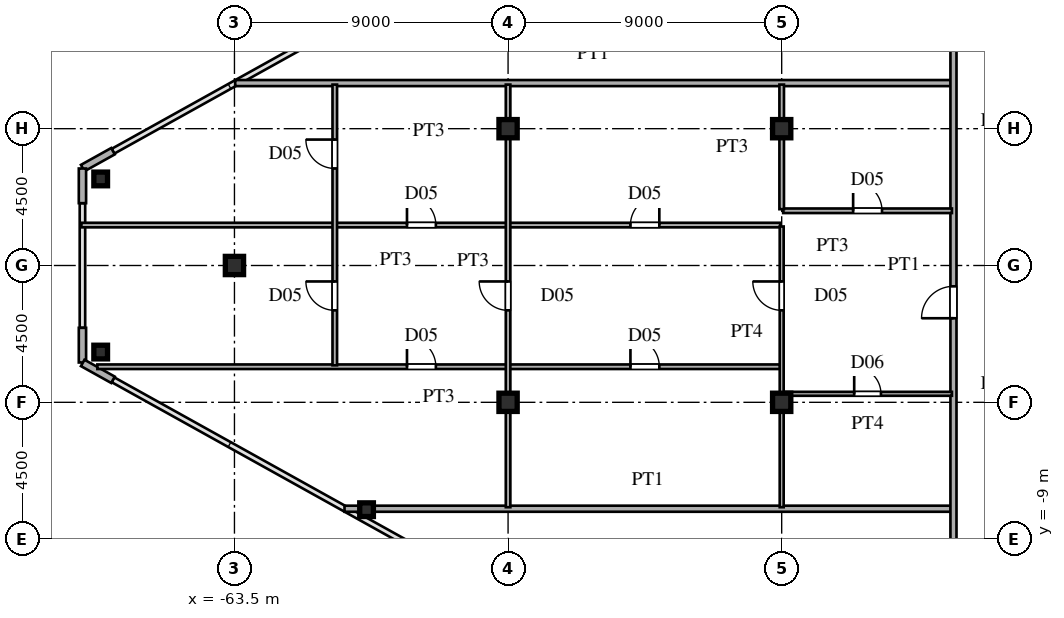
"""IFC4 building model, lengths in metres.
Left out: names, types, materials, properties, quantities, classifications, styles, units other than length and angle.
Written with IfcOpenShell. Run it as: python <this file> out.ifc"""

import sys

from ifc_helpers import new_model, si_unit, direction, frame, frame_2d, origin, origin_2d, place, context, subcontext, project, spatial, rectangle, hollow_rectangle, i_section, extrude, source, transform, mapped, element, fill, save


model = new_model("IFC4")
c1 = context("Model", 3, precision=1e-05, world=origin(), true_north=direction((0.0, 1.0)))
c2 = subcontext(c1, "Body", "Model", "MODEL_VIEW")
j1 = project(units=[si_unit("LENGTHUNIT", "METRE"), si_unit("PLANEANGLEUNIT", "RADIAN")], contexts=[c1])
p1 = place(None, origin())
s1 = spatial("IfcSite", under=j1, at=p1, CompositionType="ELEMENT")
p2 = place(p1, origin())
s2 = spatial("IfcBuilding", under=s1, at=p2, CompositionType="ELEMENT")
p3 = place(p2, frame((0.0, 0.0, 170.7)))
s3 = spatial("IfcBuildingStorey", under=s2, at=p3, CompositionType="ELEMENT", Elevation=170.7)
m1 = source(origin(), c2, "Body", "SweptSolid", [
    extrude(i_section(OverallWidth=0.6, OverallDepth=0.6, WebThickness=0.025, FlangeThickness=0.04, at=origin_2d()), origin(), (0.0, 0.0, 1.0), 3.6),
])
for number, where, z_axis, x_axis in (
    (1, (-45.5, -4.5, 0.0), (0.0, 0.0, 1.0), (1.0, 0.0, 0.0)),
    (2, (-45.5, 4.5, 0.0), (0.0, 0.0, 1.0), (1.0, 0.0, 0.0)),
    (3, (-54.5, -4.5, 0.0), (0.0, 0.0, 1.0), (1.0, 0.0, 0.0)),
    (4, (-54.5, 4.5, 0.0), (0.0, 0.0, 1.0), (1.0, 0.0, 0.0)),
    (5, (-63.5, 0.0, 0.0), (0.0, 0.0, 1.0), (1.0, 0.0, 0.0)),
):
    element("IfcColumn", number, at=place(p3, frame(where, z_axis=z_axis, x_axis=x_axis)), inside=s3, PredefinedType="COLUMN", context=c2, shape_type="MappedRepresentation", body=[
        mapped(m1, transform((0.0, 0.0, 0.0), scale=1.0)),
    ])
m2 = source(origin(), c2, "Body", "SweptSolid", [
    extrude(hollow_rectangle(XDim=0.45, YDim=0.45, WallThickness=0.018, at=origin_2d()), origin(), (0.0, 0.0, 1.0), 3.6),
])
for number, where, z_axis, x_axis in (
    (6, (-67.9, 2.847, 0.0), (0.0, 0.0, 1.0), (1.0, 0.0, 0.0)),
    (7, (-67.9, -2.847, 0.0), (0.0, 0.0, 1.0), (1.0, 0.0, 0.0)),
    (8, (-59.155, -8.031, 0.0), (0.0, 0.0, 1.0), (1.0, 0.0, 0.0)),
):
    element("IfcColumn", number, at=place(p3, frame(where, z_axis=z_axis, x_axis=x_axis)), inside=s3, PredefinedType="COLUMN", context=c2, shape_type="MappedRepresentation", body=[
        mapped(m2, transform((0.0, 0.0, 0.0), scale=1.0)),
    ])
for number, where, z_axis, x_axis in (
    (9, (-67.495, 3.759, 0.0), (0.0, 0.0, 1.0), (-0.874, -0.486, 0.0)),
    (10, (-68.5, 3.19, 0.0), (0.0, 0.0, 1.0), (0.0, -1.0, 0.0)),
    (11, (-68.5, -2.05, 0.0), (0.0, 0.0, 1.0), (0.0, -1.0, 0.0)),
    (12, (-68.491, -3.205, 0.0), (0.0, 0.0, 1.0), (0.874, -0.486, 0.0)),
):
    element("IfcWall", number, at=place(p3, frame(where, z_axis=z_axis, x_axis=x_axis)), inside=s3, PredefinedType="SOLIDWALL", context=c2, shape_type="SweptSolid", body=[
        extrude(rectangle(XDim=1.14, YDim=0.24, at=frame_2d((0.57, 0.0))), origin(), (0.0, 0.0, 1.0), 3.38),
    ])
p4 = place(p3, frame((-59.88, -8.0, 0.0), z_axis=(0.0, 0.0, 1.0), x_axis=(1.0, 0.0, 0.0)))
e13 = element("IfcWall", 13, at=p4, inside=s3, PredefinedType="PARTITIONING", context=c2, shape_type="SweptSolid", body=[
    extrude(rectangle(XDim=19.95, YDim=0.2, at=frame_2d((9.975, 0.0))), origin(), (0.0, 0.0, 1.0), 3.38),
])
p5 = place(p3, frame((-45.45, -4.22, 0.0), z_axis=(0.0, 0.0, 1.0), x_axis=(1.0, 0.0, 0.0)))
e14 = element("IfcWall", 14, at=p5, inside=s3, PredefinedType="PARTITIONING", context=c2, shape_type="SweptSolid", body=[
    extrude(rectangle(XDim=5.55, YDim=0.13, at=frame_2d((2.775, 0.0))), origin(), (0.0, 0.0, 1.0), 3.38),
])
p6 = place(p5, frame((2.335, 0.0, 0.0)))
e15 = element("IfcOpeningElement", 15, at=p6, cuts=e14, PredefinedType="OPENING", context=c2, shape_type="SweptSolid", body=[
    extrude(rectangle(XDim=0.88, YDim=2.1, at=frame_2d((0.44, 1.05))), frame((0.0, 0.075, 0.0), z_axis=(0.0, -1.0, 0.0), x_axis=(1.0, 0.0, 0.0)), (0.0, 0.0, 1.0), 0.15),
])
p7 = place(p3, frame((-68.009, -3.33, 0.0), z_axis=(0.0, 0.0, 1.0), x_axis=(1.0, 0.0, 0.0)))
e16 = element("IfcWall", 16, at=p7, inside=s3, PredefinedType="PARTITIONING", context=c2, shape_type="SweptSolid", body=[
    extrude(rectangle(XDim=22.459, YDim=0.15, at=frame_2d((11.229, 0.0))), origin(), (0.0, 0.0, 1.0), 3.38),
])
p8 = place(p7, frame((17.534, 0.0, 0.0)))
e17 = element("IfcOpeningElement", 17, at=p8, cuts=e16, PredefinedType="OPENING", context=c2, shape_type="SweptSolid", body=[
    extrude(rectangle(XDim=0.95, YDim=2.15, at=frame_2d((0.475, 1.075))), frame((0.0, 0.085, 0.0), z_axis=(0.0, -1.0, 0.0), x_axis=(1.0, 0.0, 0.0)), (0.0, 0.0, 1.0), 0.17),
])
p9 = place(p7, frame((10.184, 0.0, 0.0)))
e18 = element("IfcOpeningElement", 18, at=p9, cuts=e16, PredefinedType="OPENING", context=c2, shape_type="SweptSolid", body=[
    extrude(rectangle(XDim=0.95, YDim=2.15, at=frame_2d((0.475, 1.075))), frame((0.0, 0.085, 0.0), z_axis=(0.0, -1.0, 0.0), x_axis=(1.0, 0.0, 0.0)), (0.0, 0.0, 1.0), 0.17),
])
p10 = place(p3, frame((-68.535, 1.33, 0.0), z_axis=(0.0, 0.0, 1.0), x_axis=(1.0, 0.0, 0.0)))
e19 = element("IfcWall", 19, at=p10, inside=s3, PredefinedType="PARTITIONING", context=c2, shape_type="SweptSolid", body=[
    extrude(rectangle(XDim=22.985, YDim=0.15, at=frame_2d((11.492, 0.0))), origin(), (0.0, 0.0, 1.0), 3.38),
])
p11 = place(p10, frame((18.06, 0.0, 0.0)))
e20 = element("IfcOpeningElement", 20, at=p11, cuts=e19, PredefinedType="OPENING", context=c2, shape_type="SweptSolid", body=[
    extrude(rectangle(XDim=0.95, YDim=2.15, at=frame_2d((0.475, 1.075))), frame((0.0, 0.085, 0.0), z_axis=(0.0, -1.0, 0.0), x_axis=(1.0, 0.0, 0.0)), (0.0, 0.0, 1.0), 0.17),
])
p12 = place(p10, frame((10.71, 0.0, 0.0)))
e21 = element("IfcOpeningElement", 21, at=p12, cuts=e19, PredefinedType="OPENING", context=c2, shape_type="SweptSolid", body=[
    extrude(rectangle(XDim=0.95, YDim=2.15, at=frame_2d((0.475, 1.075))), frame((0.0, 0.085, 0.0), z_axis=(0.0, -1.0, 0.0), x_axis=(1.0, 0.0, 0.0)), (0.0, 0.0, 1.0), 0.17),
])
p13 = place(p3, frame((-45.45, 1.8, 0.0), z_axis=(0.0, 0.0, 1.0), x_axis=(1.0, 0.0, 0.0)))
e22 = element("IfcWall", 22, at=p13, inside=s3, PredefinedType="PARTITIONING", context=c2, shape_type="SweptSolid", body=[
    extrude(rectangle(XDim=5.55, YDim=0.15, at=frame_2d((2.775, 0.0))), origin(), (0.0, 0.0, 1.0), 3.38),
])
p14 = place(p13, frame((2.3, 0.0, 0.0)))
e23 = element("IfcOpeningElement", 23, at=p14, cuts=e22, PredefinedType="OPENING", context=c2, shape_type="SweptSolid", body=[
    extrude(rectangle(XDim=0.95, YDim=2.15, at=frame_2d((0.475, 1.075))), frame((0.0, 0.085, 0.0), z_axis=(0.0, -1.0, 0.0), x_axis=(1.0, 0.0, 0.0)), (0.0, 0.0, 1.0), 0.17),
])
p15 = place(p3, frame((-63.476, 6.0, 0.0), z_axis=(0.0, 0.0, 1.0), x_axis=(1.0, 0.0, 0.0)))
e24 = element("IfcWall", 24, at=p15, inside=s3, PredefinedType="PARTITIONING", context=c2, shape_type="SweptSolid", body=[
    extrude(rectangle(XDim=23.546, YDim=0.2, at=frame_2d((11.773, 0.0))), origin(), (0.0, 0.0, 1.0), 3.38),
])
p16 = place(p3, frame((-60.2, -3.283, 0.0), z_axis=(0.0, 0.0, 1.0), x_axis=(0.0, 1.0, 0.0)))
e25 = element("IfcWall", 25, at=p16, inside=s3, PredefinedType="PARTITIONING", context=c2, shape_type="SweptSolid", body=[
    extrude(rectangle(XDim=9.233, YDim=0.15, at=frame_2d((4.616, 0.0))), origin(), (0.0, 0.0, 1.0), 3.38),
])
p17 = place(p16, frame((1.808, 0.0, 0.0)))
e26 = element("IfcOpeningElement", 26, at=p17, cuts=e25, PredefinedType="OPENING", context=c2, shape_type="SweptSolid", body=[
    extrude(rectangle(XDim=0.95, YDim=2.15, at=frame_2d((0.475, 1.075))), frame((0.0, 0.085, 0.0), z_axis=(0.0, -1.0, 0.0), x_axis=(1.0, 0.0, 0.0)), (0.0, 0.0, 1.0), 0.17),
])
p18 = place(p16, frame((6.475, 0.0, 0.0)))
e27 = element("IfcOpeningElement", 27, at=p18, cuts=e25, PredefinedType="OPENING", context=c2, shape_type="SweptSolid", body=[
    extrude(rectangle(XDim=0.95, YDim=2.15, at=frame_2d((0.475, 1.075))), frame((0.0, 0.085, 0.0), z_axis=(0.0, -1.0, 0.0), x_axis=(1.0, 0.0, 0.0)), (0.0, 0.0, 1.0), 0.17),
])
p19 = place(p3, frame((-54.5, -7.95, 0.0), z_axis=(0.0, 0.0, 1.0), x_axis=(0.0, 1.0, 0.0)))
e28 = element("IfcWall", 28, at=p19, inside=s3, PredefinedType="PARTITIONING", context=c2, shape_type="SweptSolid", body=[
    extrude(rectangle(XDim=13.9, YDim=0.15, at=frame_2d((6.95, 0.0))), origin(), (0.0, 0.0, 1.0), 2.78),
])
p20 = place(p19, frame((6.475, 0.0, 0.0)))
e29 = element("IfcOpeningElement", 29, at=p20, cuts=e28, PredefinedType="OPENING", context=c2, shape_type="SweptSolid", body=[
    extrude(rectangle(XDim=0.95, YDim=2.15, at=frame_2d((0.475, 1.075))), frame((0.0, 0.085, 0.0), z_axis=(0.0, -1.0, 0.0), x_axis=(1.0, 0.0, 0.0)), (0.0, 0.0, 1.0), 0.17),
])
p21 = place(p3, frame((-45.5, -7.95, 0.0), z_axis=(0.0, 0.0, 1.0), x_axis=(0.0, 1.0, 0.0)))
e30 = element("IfcWall", 30, at=p21, inside=s3, PredefinedType="PARTITIONING", context=c2, shape_type="SweptSolid", body=[
    extrude(rectangle(XDim=9.233, YDim=0.13, at=frame_2d((4.616, 0.0))), origin(), (0.0, 0.0, 1.0), 2.78),
])
p22 = place(p21, frame((6.475, 0.0, 0.0)))
e31 = element("IfcOpeningElement", 31, at=p22, cuts=e30, PredefinedType="OPENING", context=c2, shape_type="SweptSolid", body=[
    extrude(rectangle(XDim=0.95, YDim=2.15, at=frame_2d((0.475, 1.075))), frame((0.0, 0.075, 0.0), z_axis=(0.0, -1.0, 0.0), x_axis=(1.0, 0.0, 0.0)), (0.0, 0.0, 1.0), 0.15),
])
p23 = place(p3, frame((-45.5, 1.852, 0.0), z_axis=(0.0, 0.0, 1.0), x_axis=(0.0, 1.0, 0.0)))
e32 = element("IfcWall", 32, at=p23, inside=s3, PredefinedType="PARTITIONING", context=c2, shape_type="SweptSolid", body=[
    extrude(rectangle(XDim=4.098, YDim=0.15, at=frame_2d((2.049, 0.0))), origin(), (0.0, 0.0, 1.0), 2.78),
])
p24 = place(p3, frame((-39.85, -15.715, 0.0), z_axis=(0.0, 0.0, 1.0), x_axis=(0.0, 1.0, 0.0)))
e33 = element("IfcWall", 33, at=p24, inside=s3, PredefinedType="PARTITIONING", context=c2, shape_type="SweptSolid", body=[
    extrude(rectangle(XDim=31.43, YDim=0.2, at=frame_2d((15.715, 0.0))), origin(), (0.0, 0.0, 1.0), 3.38),
])
p25 = place(p24, frame((3.29, 0.0, 0.0)))
e34 = element("IfcOpeningElement", 34, at=p25, cuts=e33, PredefinedType="OPENING", context=c2, shape_type="SweptSolid", body=[
    extrude(rectangle(XDim=1.05, YDim=2.25, at=frame_2d((0.525, 1.125))), frame((0.0, 0.11, 0.0), z_axis=(0.0, -1.0, 0.0), x_axis=(1.0, 0.0, 0.0)), (0.0, 0.0, 1.0), 0.22),
])
p26 = place(p24, frame((13.98, 0.0, 0.0)))
e35 = element("IfcOpeningElement", 35, at=p26, cuts=e33, PredefinedType="OPENING", context=c2, shape_type="SweptSolid", body=[
    extrude(rectangle(XDim=1.05, YDim=2.25, at=frame_2d((0.525, 1.125))), frame((0.0, 0.11, 0.0), z_axis=(0.0, -1.0, 0.0), x_axis=(1.0, 0.0, 0.0)), (0.0, 0.0, 1.0), 0.22),
])
p27 = place(p24, frame((26.09, 0.0, 0.0)))
e36 = element("IfcOpeningElement", 36, at=p27, cuts=e33, PredefinedType="OPENING", context=c2, shape_type="SweptSolid", body=[
    extrude(rectangle(XDim=1.05, YDim=2.25, at=frame_2d((0.525, 1.125))), frame((0.0, 0.11, 0.0), z_axis=(0.0, -1.0, 0.0), x_axis=(1.0, 0.0, 0.0)), (0.0, 0.0, 1.0), 0.22),
])
m3 = source(origin(), c2, "Body", "SweptSolid", [
    extrude(rectangle(XDim=0.88, YDim=2.1, at=frame_2d((0.44, 1.05))), frame((0.0, 0.025, 0.0), z_axis=(0.0, -1.0, 0.0), x_axis=(1.0, 0.0, 0.0)), (0.0, 0.0, 1.0), 0.05),
])
p28 = place(p6, origin())
e37 = element("IfcDoor", 37, at=p28, inside=s3, OperationType="SINGLE_SWING_LEFT", PredefinedType="DOOR", context=c2, shape_type="MappedRepresentation", body=[
    mapped(m3, transform((0.0, 0.0, 0.0), scale=1.0)),
])
fill(e15, e37)
m4 = source(origin(), c2, "Body", "SweptSolid", [
    extrude(rectangle(XDim=0.95, YDim=2.15, at=frame_2d((0.475, 1.075))), frame((0.0, 0.025, 0.0), z_axis=(0.0, -1.0, 0.0), x_axis=(1.0, 0.0, 0.0)), (0.0, 0.0, 1.0), 0.05),
])
p29 = place(p8, origin())
e38 = element("IfcDoor", 38, at=p29, inside=s3, OperationType="SINGLE_SWING_LEFT", PredefinedType="DOOR", context=c2, shape_type="MappedRepresentation", body=[
    mapped(m4, transform((0.0, 0.0, 0.0), scale=1.0)),
])
fill(e17, e38)
p30 = place(p9, origin())
e39 = element("IfcDoor", 39, at=p30, inside=s3, OperationType="SINGLE_SWING_LEFT", PredefinedType="DOOR", context=c2, shape_type="MappedRepresentation", body=[
    mapped(m4, transform((0.0, 0.0, 0.0), scale=1.0)),
])
fill(e18, e39)
p31 = place(p11, origin())
e40 = element("IfcDoor", 40, at=p31, inside=s3, OperationType="SINGLE_SWING_RIGHT", PredefinedType="DOOR", context=c2, shape_type="MappedRepresentation", body=[
    mapped(m4, transform((0.0, 0.0, 0.0), scale=1.0)),
])
fill(e20, e40)
p32 = place(p12, origin())
e41 = element("IfcDoor", 41, at=p32, inside=s3, OperationType="SINGLE_SWING_LEFT", PredefinedType="DOOR", context=c2, shape_type="MappedRepresentation", body=[
    mapped(m4, transform((0.0, 0.0, 0.0), scale=1.0)),
])
fill(e21, e41)
p33 = place(p14, origin())
e42 = element("IfcDoor", 42, at=p33, inside=s3, OperationType="SINGLE_SWING_LEFT", PredefinedType="DOOR", context=c2, shape_type="MappedRepresentation", body=[
    mapped(m4, transform((0.0, 0.0, 0.0), scale=1.0)),
])
fill(e23, e42)
p34 = place(p17, origin())
e43 = element("IfcDoor", 43, at=p34, inside=s3, OperationType="SINGLE_SWING_RIGHT", PredefinedType="DOOR", context=c2, shape_type="MappedRepresentation", body=[
    mapped(m4, transform((0.0, 0.0, 0.0), scale=1.0)),
])
fill(e26, e43)
p35 = place(p18, origin())
e44 = element("IfcDoor", 44, at=p35, inside=s3, OperationType="SINGLE_SWING_RIGHT", PredefinedType="DOOR", context=c2, shape_type="MappedRepresentation", body=[
    mapped(m4, transform((0.0, 0.0, 0.0), scale=1.0)),
])
fill(e27, e44)
p36 = place(p20, origin())
e45 = element("IfcDoor", 45, at=p36, inside=s3, OperationType="SINGLE_SWING_RIGHT", PredefinedType="DOOR", context=c2, shape_type="MappedRepresentation", body=[
    mapped(m4, transform((0.0, 0.0, 0.0), scale=1.0)),
])
fill(e29, e45)
p37 = place(p22, origin())
e46 = element("IfcDoor", 46, at=p37, inside=s3, OperationType="SINGLE_SWING_RIGHT", PredefinedType="DOOR", context=c2, shape_type="MappedRepresentation", body=[
    mapped(m4, transform((0.0, 0.0, 0.0), scale=1.0)),
])
fill(e31, e46)
m5 = source(origin(), c2, "Body", "SweptSolid", [
    extrude(rectangle(XDim=1.05, YDim=2.25, at=frame_2d((0.525, 1.125))), frame((0.0, 0.025, 0.0), z_axis=(0.0, -1.0, 0.0), x_axis=(1.0, 0.0, 0.0)), (0.0, 0.0, 1.0), 0.05),
])
p38 = place(p26, origin())
e47 = element("IfcDoor", 47, at=p38, inside=s3, OperationType="SINGLE_SWING_LEFT", PredefinedType="DOOR", context=c2, shape_type="MappedRepresentation", body=[
    mapped(m5, transform((0.0, 0.0, 0.0), scale=1.0)),
])
fill(e35, e47)
save(model, sys.argv[1])
